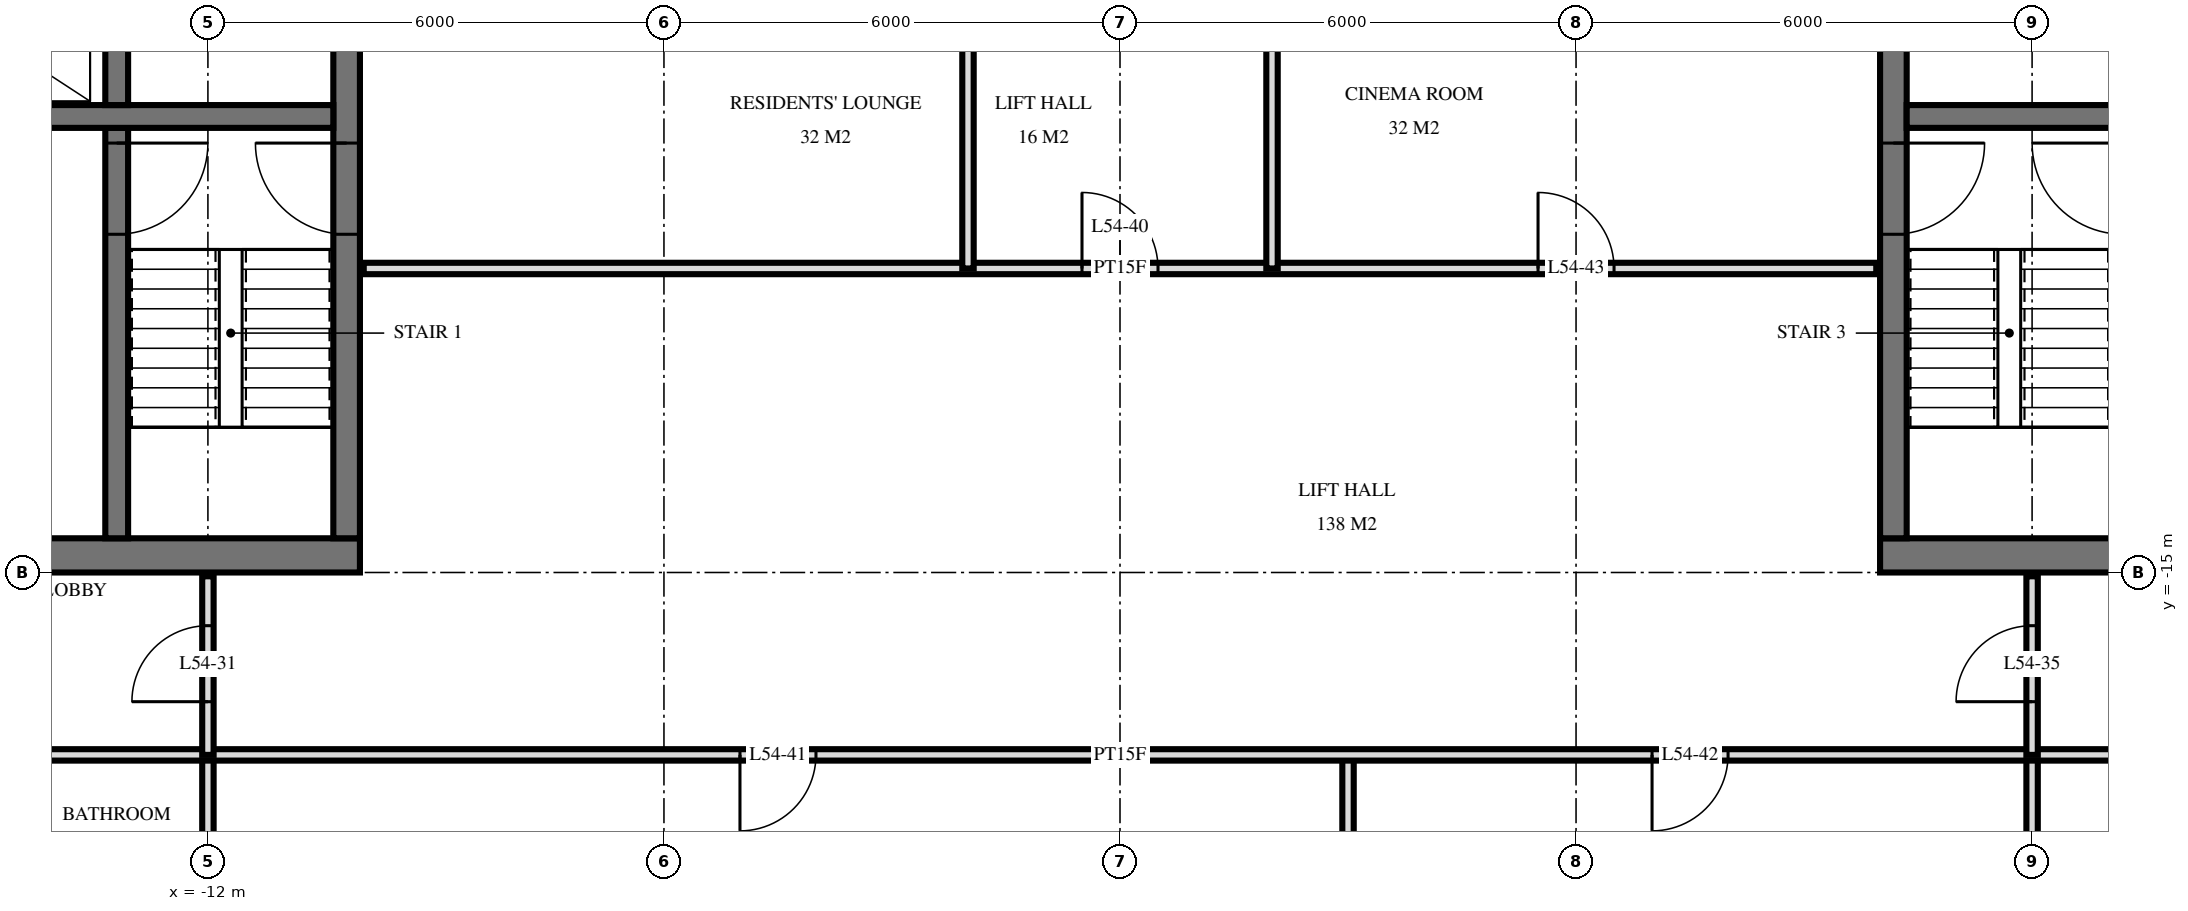
"""IFC4 building model, lengths in metres.
Left out: names, types, materials, properties, quantities, classifications, styles, units other than length and angle.
Written with IfcOpenShell. Run it as: python <this file> out.ifc"""

import sys

from ifc_helpers import new_model, si_unit, direction, frame, frame_2d, origin, place, context, subcontext, project, spatial, rectangle, extrude, element, fill, save


model = new_model("IFC4")
c1 = context("Model", 3, precision=1e-05, world=origin(), true_north=direction((0.0, 1.0)))
c2 = subcontext(c1, "Body", "Model", "MODEL_VIEW")
j1 = project(units=[si_unit("LENGTHUNIT", "METRE"), si_unit("PLANEANGLEUNIT", "RADIAN")], contexts=[c1])
p1 = place(None, origin())
s1 = spatial("IfcSite", under=j1, at=p1, CompositionType="ELEMENT")
p2 = place(p1, origin())
s2 = spatial("IfcBuilding", under=s1, at=p2, CompositionType="ELEMENT")
p3 = place(p2, frame((0.0, 0.0, 208.1)))
s3 = spatial("IfcBuildingStorey", under=s2, at=p3, CompositionType="ELEMENT", Elevation=208.1)
p4 = place(p3, frame((-24.5, -14.775, 0.0), z_axis=(0.0, 0.0, 1.0), x_axis=(1.0, 0.0, 0.0)))
e1 = element("IfcWall", 1, at=p4, inside=s3, PredefinedType="SHEAR", context=c2, shape_type="SweptSolid", body=[
    extrude(rectangle(XDim=14.5, YDim=0.45, at=frame_2d((7.25, 0.0))), origin(), (0.0, 0.0, 1.0), 3.5),
])
p5 = place(p4, frame((6.2, 0.0, 0.0)))
e2 = element("IfcOpeningElement", 2, at=p5, cuts=e1, PredefinedType="OPENING", context=c2, shape_type="SweptSolid", body=[
    extrude(rectangle(XDim=1.2, YDim=2.1, at=frame_2d((0.6, 1.05))), frame((0.0, 0.235, 0.0), z_axis=(0.0, -1.0, 0.0), x_axis=(1.0, 0.0, 0.0)), (0.0, 0.0, 1.0), 0.47),
])
p6 = place(p4, frame((9.25, 0.0, 0.0)))
e3 = element("IfcOpeningElement", 3, at=p6, cuts=e1, PredefinedType="OPENING", context=c2, shape_type="SweptSolid", body=[
    extrude(rectangle(XDim=1.1, YDim=2.1, at=frame_2d((0.55, 1.05))), frame((0.0, 0.235, 0.0), z_axis=(0.0, -1.0, 0.0), x_axis=(1.0, 0.0, 0.0)), (0.0, 0.0, 1.0), 0.47),
])
p7 = place(p4, frame((3.5, 0.0, 0.0)))
e4 = element("IfcOpeningElement", 4, at=p7, cuts=e1, PredefinedType="OPENING", context=c2, shape_type="SweptSolid", body=[
    extrude(rectangle(XDim=0.9, YDim=2.1, at=frame_2d((0.45, 1.05))), frame((0.0, 0.235, 0.0), z_axis=(0.0, -1.0, 0.0), x_axis=(1.0, 0.0, 0.0)), (0.0, 0.0, 1.0), 0.47),
])
p8 = place(p4, frame((1.05, 0.0, 0.0)))
e5 = element("IfcOpeningElement", 5, at=p8, cuts=e1, PredefinedType="OPENING", context=c2, shape_type="SweptSolid", body=[
    extrude(rectangle(XDim=1.0, YDim=2.1, at=frame_2d((0.5, 1.05))), frame((0.0, 0.235, 0.0), z_axis=(0.0, -1.0, 0.0), x_axis=(1.0, 0.0, 0.0)), (0.0, 0.0, 1.0), 0.47),
])
p9 = place(p3, frame((-10.175, -14.55, 0.0), z_axis=(0.0, 0.0, 1.0), x_axis=(0.0, 1.0, 0.0)))
e6 = element("IfcWall", 6, at=p9, inside=s3, PredefinedType="SHEAR", context=c2, shape_type="SweptSolid", body=[
    extrude(rectangle(XDim=14.1, YDim=0.35, at=frame_2d((7.05, 0.0))), origin(), (0.0, 0.0, 1.0), 3.5),
])
p10 = place(p9, frame((8.4, 0.0, 0.0)))
e7 = element("IfcOpeningElement", 7, at=p10, cuts=e6, PredefinedType="OPENING", context=c2, shape_type="SweptSolid", body=[
    extrude(rectangle(XDim=1.4, YDim=2.4, at=frame_2d((0.7, 1.2))), frame((0.0, 0.185, 0.0), z_axis=(0.0, -1.0, 0.0), x_axis=(1.0, 0.0, 0.0)), (0.0, 0.0, 1.0), 0.37),
])
p11 = place(p9, frame((10.0, 0.0, 0.0)))
e8 = element("IfcOpeningElement", 8, at=p11, cuts=e6, PredefinedType="OPENING", context=c2, shape_type="SweptSolid", body=[
    extrude(rectangle(XDim=1.4, YDim=2.4, at=frame_2d((0.7, 1.2))), frame((0.0, 0.185, 0.0), z_axis=(0.0, -1.0, 0.0), x_axis=(1.0, 0.0, 0.0)), (0.0, 0.0, 1.0), 0.37),
])
p12 = place(p9, frame((4.0, 0.0, 0.0)))
e9 = element("IfcOpeningElement", 9, at=p12, cuts=e6, PredefinedType="OPENING", context=c2, shape_type="SweptSolid", body=[
    extrude(rectangle(XDim=1.2, YDim=2.1, at=frame_2d((0.6, 1.05))), frame((0.0, 0.185, 0.0), z_axis=(0.0, -1.0, 0.0), x_axis=(1.0, 0.0, 0.0)), (0.0, 0.0, 1.0), 0.37),
])
p13 = place(p3, frame((-24.05, -9.0, 0.0), z_axis=(0.0, 0.0, 1.0), x_axis=(1.0, 0.0, 0.0)))
e10 = element("IfcWall", 10, at=p13, inside=s3, PredefinedType="SHEAR", context=c2, shape_type="SweptSolid", body=[
    extrude(rectangle(XDim=13.7, YDim=0.3, at=frame_2d((6.85, 0.0))), origin(), (0.0, 0.0, 1.0), 3.5),
])
p14 = place(p13, frame((8.8, 0.0, 0.0)))
e11 = element("IfcOpeningElement", 11, at=p14, cuts=e10, PredefinedType="OPENING", context=c2, shape_type="SweptSolid", body=[
    extrude(rectangle(XDim=1.1, YDim=2.1, at=frame_2d((0.55, 1.05))), frame((0.0, 0.16, 0.0), z_axis=(0.0, -1.0, 0.0), x_axis=(1.0, 0.0, 0.0)), (0.0, 0.0, 1.0), 0.32),
])
p15 = place(p3, frame((-13.2, -8.85, 0.0), z_axis=(0.0, 0.0, 1.0), x_axis=(0.0, 1.0, 0.0)))
e12 = element("IfcWall", 12, at=p15, inside=s3, PredefinedType="SHEAR", context=c2, shape_type="SweptSolid", body=[
    extrude(rectangle(XDim=2.3, YDim=0.3, at=frame_2d((1.15, 0.0))), origin(), (0.0, 0.0, 1.0), 3.5),
])
p16 = place(p3, frame((-13.2, -14.55, 0.0), z_axis=(0.0, 0.0, 1.0), x_axis=(0.0, 1.0, 0.0)))
e13 = element("IfcWall", 13, at=p16, inside=s3, PredefinedType="SHEAR", context=c2, shape_type="SweptSolid", body=[
    extrude(rectangle(XDim=5.4, YDim=0.3, at=frame_2d((2.7, 0.0))), origin(), (0.0, 0.0, 1.0), 3.5),
])
p17 = place(p16, frame((4.0, 0.0, 0.0)))
e14 = element("IfcOpeningElement", 14, at=p17, cuts=e13, PredefinedType="OPENING", context=c2, shape_type="SweptSolid", body=[
    extrude(rectangle(XDim=1.2, YDim=2.1, at=frame_2d((0.6, 1.05))), frame((0.0, 0.16, 0.0), z_axis=(0.0, -1.0, 0.0), x_axis=(1.0, 0.0, 0.0)), (0.0, 0.0, 1.0), 0.32),
])
p18 = place(p3, frame((10.0, -14.775, 0.0), z_axis=(0.0, 0.0, 1.0), x_axis=(1.0, 0.0, 0.0)))
e15 = element("IfcWall", 15, at=p18, inside=s3, PredefinedType="SHEAR", context=c2, shape_type="SweptSolid", body=[
    extrude(rectangle(XDim=14.5, YDim=0.45, at=frame_2d((7.25, 0.0))), origin(), (0.0, 0.0, 1.0), 3.5),
])
p19 = place(p18, frame((7.1, 0.0, 0.0)))
e16 = element("IfcOpeningElement", 16, at=p19, cuts=e15, PredefinedType="OPENING", context=c2, shape_type="SweptSolid", body=[
    extrude(rectangle(XDim=1.2, YDim=2.1, at=frame_2d((0.6, 1.05))), frame((0.0, 0.235, 0.0), z_axis=(0.0, -1.0, 0.0), x_axis=(1.0, 0.0, 0.0)), (0.0, 0.0, 1.0), 0.47),
])
p20 = place(p18, frame((4.15, 0.0, 0.0)))
e17 = element("IfcOpeningElement", 17, at=p20, cuts=e15, PredefinedType="OPENING", context=c2, shape_type="SweptSolid", body=[
    extrude(rectangle(XDim=1.1, YDim=2.1, at=frame_2d((0.55, 1.05))), frame((0.0, 0.235, 0.0), z_axis=(0.0, -1.0, 0.0), x_axis=(1.0, 0.0, 0.0)), (0.0, 0.0, 1.0), 0.47),
])
p21 = place(p18, frame((10.1, 0.0, 0.0)))
e18 = element("IfcOpeningElement", 18, at=p21, cuts=e15, PredefinedType="OPENING", context=c2, shape_type="SweptSolid", body=[
    extrude(rectangle(XDim=0.9, YDim=2.1, at=frame_2d((0.45, 1.05))), frame((0.0, 0.235, 0.0), z_axis=(0.0, -1.0, 0.0), x_axis=(1.0, 0.0, 0.0)), (0.0, 0.0, 1.0), 0.47),
])
p22 = place(p18, frame((12.45, 0.0, 0.0)))
e19 = element("IfcOpeningElement", 19, at=p22, cuts=e15, PredefinedType="OPENING", context=c2, shape_type="SweptSolid", body=[
    extrude(rectangle(XDim=1.0, YDim=2.1, at=frame_2d((0.5, 1.05))), frame((0.0, 0.235, 0.0), z_axis=(0.0, -1.0, 0.0), x_axis=(1.0, 0.0, 0.0)), (0.0, 0.0, 1.0), 0.47),
])
p23 = place(p3, frame((10.175, -14.55, 0.0), z_axis=(0.0, 0.0, 1.0), x_axis=(0.0, 1.0, 0.0)))
e20 = element("IfcWall", 20, at=p23, inside=s3, PredefinedType="SHEAR", context=c2, shape_type="SweptSolid", body=[
    extrude(rectangle(XDim=14.1, YDim=0.35, at=frame_2d((7.05, 0.0))), origin(), (0.0, 0.0, 1.0), 3.5),
])
p24 = place(p23, frame((8.4, 0.0, 0.0)))
e21 = element("IfcOpeningElement", 21, at=p24, cuts=e20, PredefinedType="OPENING", context=c2, shape_type="SweptSolid", body=[
    extrude(rectangle(XDim=1.4, YDim=2.4, at=frame_2d((0.7, 1.2))), frame((0.0, 0.185, 0.0), z_axis=(0.0, -1.0, 0.0), x_axis=(1.0, 0.0, 0.0)), (0.0, 0.0, 1.0), 0.37),
])
p25 = place(p23, frame((10.0, 0.0, 0.0)))
e22 = element("IfcOpeningElement", 22, at=p25, cuts=e20, PredefinedType="OPENING", context=c2, shape_type="SweptSolid", body=[
    extrude(rectangle(XDim=1.4, YDim=2.4, at=frame_2d((0.7, 1.2))), frame((0.0, 0.185, 0.0), z_axis=(0.0, -1.0, 0.0), x_axis=(1.0, 0.0, 0.0)), (0.0, 0.0, 1.0), 0.37),
])
p26 = place(p23, frame((4.0, 0.0, 0.0)))
e23 = element("IfcOpeningElement", 23, at=p26, cuts=e20, PredefinedType="OPENING", context=c2, shape_type="SweptSolid", body=[
    extrude(rectangle(XDim=1.2, YDim=2.1, at=frame_2d((0.6, 1.05))), frame((0.0, 0.185, 0.0), z_axis=(0.0, -1.0, 0.0), x_axis=(1.0, 0.0, 0.0)), (0.0, 0.0, 1.0), 0.37),
])
p27 = place(p3, frame((10.35, -9.0, 0.0), z_axis=(0.0, 0.0, 1.0), x_axis=(1.0, 0.0, 0.0)))
e24 = element("IfcWall", 24, at=p27, inside=s3, PredefinedType="SHEAR", context=c2, shape_type="SweptSolid", body=[
    extrude(rectangle(XDim=13.7, YDim=0.3, at=frame_2d((6.85, 0.0))), origin(), (0.0, 0.0, 1.0), 3.5),
])
p28 = place(p27, frame((3.8, 0.0, 0.0)))
e25 = element("IfcOpeningElement", 25, at=p28, cuts=e24, PredefinedType="OPENING", context=c2, shape_type="SweptSolid", body=[
    extrude(rectangle(XDim=1.1, YDim=2.1, at=frame_2d((0.55, 1.05))), frame((0.0, 0.16, 0.0), z_axis=(0.0, -1.0, 0.0), x_axis=(1.0, 0.0, 0.0)), (0.0, 0.0, 1.0), 0.32),
])
p29 = place(p3, frame((12.0, -17.4, 0.0), z_axis=(0.0, 0.0, 1.0), x_axis=(0.0, 1.0, 0.0)))
e26 = element("IfcWall", 26, at=p29, inside=s3, PredefinedType="PARTITIONING", context=c2, shape_type="SweptSolid", body=[
    extrude(rectangle(XDim=2.35, YDim=0.15, at=frame_2d((1.175, 0.0))), origin(), (0.0, 0.0, 1.0), 3.22),
])
p30 = place(p29, frame((0.7, 0.0, 0.0)))
e27 = element("IfcOpeningElement", 27, at=p30, cuts=e26, PredefinedType="OPENING", context=c2, shape_type="SweptSolid", body=[
    extrude(rectangle(XDim=1.0, YDim=2.1, at=frame_2d((0.5, 1.05))), frame((0.0, 0.085, 0.0), z_axis=(0.0, -1.0, 0.0), x_axis=(1.0, 0.0, 0.0)), (0.0, 0.0, 1.0), 0.17),
])
for number, where, z_axis, x_axis in (
    (28, (12.0, -29.22, 0.0), (0.0, 0.0, 1.0), (0.0, 1.0, 0.0)),
    (29, (3.0, -29.22, 0.0), (0.0, 0.0, 1.0), (0.0, 1.0, 0.0)),
):
    element("IfcWall", number, at=place(p3, frame(where, z_axis=z_axis, x_axis=x_axis)), inside=s3, PredefinedType="PARTITIONING", context=c2, shape_type="SweptSolid", body=[
        extrude(rectangle(XDim=11.82, YDim=0.15, at=frame_2d((5.91, 0.0))), origin(), (0.0, 0.0, 1.0), 3.22),
    ])
for number, where, z_axis, x_axis in (
    (30, (2.0, -11.0, 0.0), (0.0, 0.0, 1.0), (0.0, 1.0, 0.0)),
    (31, (-2.0, -11.0, 0.0), (0.0, 0.0, 1.0), (0.0, 1.0, 0.0)),
):
    element("IfcWall", number, at=place(p3, frame(where, z_axis=z_axis, x_axis=x_axis)), inside=s3, PredefinedType="PARTITIONING", context=c2, shape_type="SweptSolid", body=[
        extrude(rectangle(XDim=4.0, YDim=0.15, at=frame_2d((2.0, 0.0))), origin(), (0.0, 0.0, 1.0), 3.22),
    ])
p31 = place(p3, frame((-12.0, -17.4, 0.0), z_axis=(0.0, 0.0, 1.0), x_axis=(0.0, 1.0, 0.0)))
e32 = element("IfcWall", 32, at=p31, inside=s3, PredefinedType="PARTITIONING", context=c2, shape_type="SweptSolid", body=[
    extrude(rectangle(XDim=2.35, YDim=0.15, at=frame_2d((1.175, 0.0))), origin(), (0.0, 0.0, 1.0), 3.22),
])
p32 = place(p31, frame((0.7, 0.0, 0.0)))
e33 = element("IfcOpeningElement", 33, at=p32, cuts=e32, PredefinedType="OPENING", context=c2, shape_type="SweptSolid", body=[
    extrude(rectangle(XDim=1.0, YDim=2.1, at=frame_2d((0.5, 1.05))), frame((0.0, 0.085, 0.0), z_axis=(0.0, -1.0, 0.0), x_axis=(1.0, 0.0, 0.0)), (0.0, 0.0, 1.0), 0.17),
])
p33 = place(p3, frame((-12.0, -29.22, 0.0), z_axis=(0.0, 0.0, 1.0), x_axis=(0.0, 1.0, 0.0)))
e34 = element("IfcWall", 34, at=p33, inside=s3, PredefinedType="PARTITIONING", context=c2, shape_type="SweptSolid", body=[
    extrude(rectangle(XDim=11.82, YDim=0.15, at=frame_2d((5.91, 0.0))), origin(), (0.0, 0.0, 1.0), 3.22),
])
p34 = place(p3, frame((-26.82, -17.4, 0.0), z_axis=(0.0, 0.0, 1.0), x_axis=(1.0, 0.0, 0.0)))
e35 = element("IfcWall", 35, at=p34, inside=s3, PredefinedType="PARTITIONING", context=c2, shape_type="SweptSolid", body=[
    extrude(rectangle(XDim=53.64, YDim=0.15, at=frame_2d((26.82, 0.0))), origin(), (0.0, 0.0, 1.0), 3.22),
])
p35 = place(p34, frame((4.92, 0.0, 0.0)))
e36 = element("IfcOpeningElement", 36, at=p35, cuts=e35, PredefinedType="OPENING", context=c2, shape_type="SweptSolid", body=[
    extrude(rectangle(XDim=1.0, YDim=2.1, at=frame_2d((0.5, 1.05))), frame((0.0, 0.085, 0.0), z_axis=(0.0, -1.0, 0.0), x_axis=(1.0, 0.0, 0.0)), (0.0, 0.0, 1.0), 0.17),
])
p36 = place(p34, frame((1.62, 0.0, 0.0)))
e37 = element("IfcOpeningElement", 37, at=p36, cuts=e35, PredefinedType="OPENING", context=c2, shape_type="SweptSolid", body=[
    extrude(rectangle(XDim=1.0, YDim=2.1, at=frame_2d((0.5, 1.05))), frame((0.0, 0.085, 0.0), z_axis=(0.0, -1.0, 0.0), x_axis=(1.0, 0.0, 0.0)), (0.0, 0.0, 1.0), 0.17),
])
p37 = place(p34, frame((41.17, 0.0, 0.0)))
e38 = element("IfcOpeningElement", 38, at=p37, cuts=e35, PredefinedType="OPENING", context=c2, shape_type="SweptSolid", body=[
    extrude(rectangle(XDim=1.0, YDim=2.1, at=frame_2d((0.5, 1.05))), frame((0.0, 0.085, 0.0), z_axis=(0.0, -1.0, 0.0), x_axis=(1.0, 0.0, 0.0)), (0.0, 0.0, 1.0), 0.17),
])
p38 = place(p34, frame((49.42, 0.0, 0.0)))
e39 = element("IfcOpeningElement", 39, at=p38, cuts=e35, PredefinedType="OPENING", context=c2, shape_type="SweptSolid", body=[
    extrude(rectangle(XDim=1.0, YDim=2.1, at=frame_2d((0.5, 1.05))), frame((0.0, 0.085, 0.0), z_axis=(0.0, -1.0, 0.0), x_axis=(1.0, 0.0, 0.0)), (0.0, 0.0, 1.0), 0.17),
])
p39 = place(p34, frame((47.62, 0.0, 0.0)))
e40 = element("IfcOpeningElement", 40, at=p39, cuts=e35, PredefinedType="OPENING", context=c2, shape_type="SweptSolid", body=[
    extrude(rectangle(XDim=1.0, YDim=2.1, at=frame_2d((0.5, 1.05))), frame((0.0, 0.085, 0.0), z_axis=(0.0, -1.0, 0.0), x_axis=(1.0, 0.0, 0.0)), (0.0, 0.0, 1.0), 0.17),
])
p40 = place(p34, frame((21.82, 0.0, 0.0)))
e41 = element("IfcOpeningElement", 41, at=p40, cuts=e35, PredefinedType="OPENING", context=c2, shape_type="SweptSolid", body=[
    extrude(rectangle(XDim=1.0, YDim=2.1, at=frame_2d((0.5, 1.05))), frame((0.0, 0.085, 0.0), z_axis=(0.0, -1.0, 0.0), x_axis=(1.0, 0.0, 0.0)), (0.0, 0.0, 1.0), 0.17),
])
p41 = place(p34, frame((33.82, 0.0, 0.0)))
e42 = element("IfcOpeningElement", 42, at=p41, cuts=e35, PredefinedType="OPENING", context=c2, shape_type="SweptSolid", body=[
    extrude(rectangle(XDim=1.0, YDim=2.1, at=frame_2d((0.5, 1.05))), frame((0.0, 0.085, 0.0), z_axis=(0.0, -1.0, 0.0), x_axis=(1.0, 0.0, 0.0)), (0.0, 0.0, 1.0), 0.17),
])
p42 = place(p3, frame((-9.95, -11.0, 0.0), z_axis=(0.0, 0.0, 1.0), x_axis=(1.0, 0.0, 0.0)))
e43 = element("IfcWall", 43, at=p42, inside=s3, PredefinedType="PARTITIONING", context=c2, shape_type="SweptSolid", body=[
    extrude(rectangle(XDim=19.9, YDim=0.15, at=frame_2d((9.95, 0.0))), origin(), (0.0, 0.0, 1.0), 3.22),
])
p43 = place(p42, frame((9.45, 0.0, 0.0)))
e44 = element("IfcOpeningElement", 44, at=p43, cuts=e43, PredefinedType="OPENING", context=c2, shape_type="SweptSolid", body=[
    extrude(rectangle(XDim=1.0, YDim=2.1, at=frame_2d((0.5, 1.05))), frame((0.0, 0.085, 0.0), z_axis=(0.0, -1.0, 0.0), x_axis=(1.0, 0.0, 0.0)), (0.0, 0.0, 1.0), 0.17),
])
p44 = place(p42, frame((15.45, 0.0, 0.0)))
e45 = element("IfcOpeningElement", 45, at=p44, cuts=e43, PredefinedType="OPENING", context=c2, shape_type="SweptSolid", body=[
    extrude(rectangle(XDim=1.0, YDim=2.1, at=frame_2d((0.5, 1.05))), frame((0.0, 0.085, 0.0), z_axis=(0.0, -1.0, 0.0), x_axis=(1.0, 0.0, 0.0)), (0.0, 0.0, 1.0), 0.17),
])
p45 = place(p12, origin())
e46 = element("IfcDoor", 46, at=p45, inside=s3, OperationType="SINGLE_SWING_LEFT", PredefinedType="DOOR", context=c2, shape_type="SweptSolid", body=[
    extrude(rectangle(XDim=1.2, YDim=2.1, at=frame_2d((0.6, 1.05))), frame((0.0, 0.025, 0.0), z_axis=(0.0, -1.0, 0.0), x_axis=(1.0, 0.0, 0.0)), (0.0, 0.0, 1.0), 0.05),
])
fill(e9, e46)
p46 = place(p17, frame((0.6, 0.0, 0.0), z_axis=(0.0, 0.0, 1.0), x_axis=(-1.0, 0.0, 0.0)))
e47 = element("IfcDoor", 47, at=p46, inside=s3, OperationType="SINGLE_SWING_RIGHT", PredefinedType="DOOR", context=c2, shape_type="SweptSolid", body=[
    extrude(rectangle(XDim=1.2, YDim=2.1, at=frame_2d((0.0, 1.05))), frame((0.0, -0.025, 0.0), z_axis=(0.0, 1.0, 0.0), x_axis=(-1.0, 0.0, 0.0)), (0.0, 0.0, 1.0), 0.05),
])
fill(e14, e47)
p47 = place(p26, frame((0.6, 0.0, 0.0), z_axis=(0.0, 0.0, 1.0), x_axis=(-1.0, 0.0, 0.0)))
e48 = element("IfcDoor", 48, at=p47, inside=s3, OperationType="SINGLE_SWING_RIGHT", PredefinedType="DOOR", context=c2, shape_type="SweptSolid", body=[
    extrude(rectangle(XDim=1.2, YDim=2.1, at=frame_2d((0.0, 1.05))), frame((0.0, -0.025, 0.0), z_axis=(0.0, 1.0, 0.0), x_axis=(-1.0, 0.0, 0.0)), (0.0, 0.0, 1.0), 0.05),
])
fill(e23, e48)
p48 = place(p32, origin())
e49 = element("IfcDoor", 49, at=p48, inside=s3, OperationType="SINGLE_SWING_RIGHT", PredefinedType="DOOR", context=c2, shape_type="SweptSolid", body=[
    extrude(rectangle(XDim=1.0, YDim=2.1, at=frame_2d((0.5, 1.05))), frame((0.0, 0.025, 0.0), z_axis=(0.0, -1.0, 0.0), x_axis=(1.0, 0.0, 0.0)), (0.0, 0.0, 1.0), 0.05),
])
fill(e33, e49)
p49 = place(p30, origin())
e50 = element("IfcDoor", 50, at=p49, inside=s3, OperationType="SINGLE_SWING_RIGHT", PredefinedType="DOOR", context=c2, shape_type="SweptSolid", body=[
    extrude(rectangle(XDim=1.0, YDim=2.1, at=frame_2d((0.5, 1.05))), frame((0.0, 0.025, 0.0), z_axis=(0.0, -1.0, 0.0), x_axis=(1.0, 0.0, 0.0)), (0.0, 0.0, 1.0), 0.05),
])
fill(e27, e50)
p50 = place(p43, origin())
e51 = element("IfcDoor", 51, at=p50, inside=s3, OperationType="SINGLE_SWING_RIGHT", PredefinedType="DOOR", context=c2, shape_type="SweptSolid", body=[
    extrude(rectangle(XDim=1.0, YDim=2.1, at=frame_2d((0.5, 1.05))), frame((0.0, 0.025, 0.0), z_axis=(0.0, -1.0, 0.0), x_axis=(1.0, 0.0, 0.0)), (0.0, 0.0, 1.0), 0.05),
])
fill(e44, e51)
p51 = place(p40, frame((0.5, 0.0, 0.0), z_axis=(0.0, 0.0, 1.0), x_axis=(-1.0, 0.0, 0.0)))
e52 = element("IfcDoor", 52, at=p51, inside=s3, OperationType="SINGLE_SWING_LEFT", PredefinedType="DOOR", context=c2, shape_type="SweptSolid", body=[
    extrude(rectangle(XDim=1.0, YDim=2.1, at=frame_2d((0.0, 1.05))), frame((0.0, -0.025, 0.0), z_axis=(0.0, 1.0, 0.0), x_axis=(-1.0, 0.0, 0.0)), (0.0, 0.0, 1.0), 0.05),
])
fill(e41, e52)
p52 = place(p41, frame((0.5, 0.0, 0.0), z_axis=(0.0, 0.0, 1.0), x_axis=(-1.0, 0.0, 0.0)))
e53 = element("IfcDoor", 53, at=p52, inside=s3, OperationType="SINGLE_SWING_LEFT", PredefinedType="DOOR", context=c2, shape_type="SweptSolid", body=[
    extrude(rectangle(XDim=1.0, YDim=2.1, at=frame_2d((0.0, 1.05))), frame((0.0, -0.025, 0.0), z_axis=(0.0, 1.0, 0.0), x_axis=(-1.0, 0.0, 0.0)), (0.0, 0.0, 1.0), 0.05),
])
fill(e42, e53)
p53 = place(p44, origin())
e54 = element("IfcDoor", 54, at=p53, inside=s3, OperationType="SINGLE_SWING_RIGHT", PredefinedType="DOOR", context=c2, shape_type="SweptSolid", body=[
    extrude(rectangle(XDim=1.0, YDim=2.1, at=frame_2d((0.5, 1.05))), frame((0.0, 0.025, 0.0), z_axis=(0.0, -1.0, 0.0), x_axis=(1.0, 0.0, 0.0)), (0.0, 0.0, 1.0), 0.05),
])
fill(e45, e54)
save(model, sys.argv[1])
